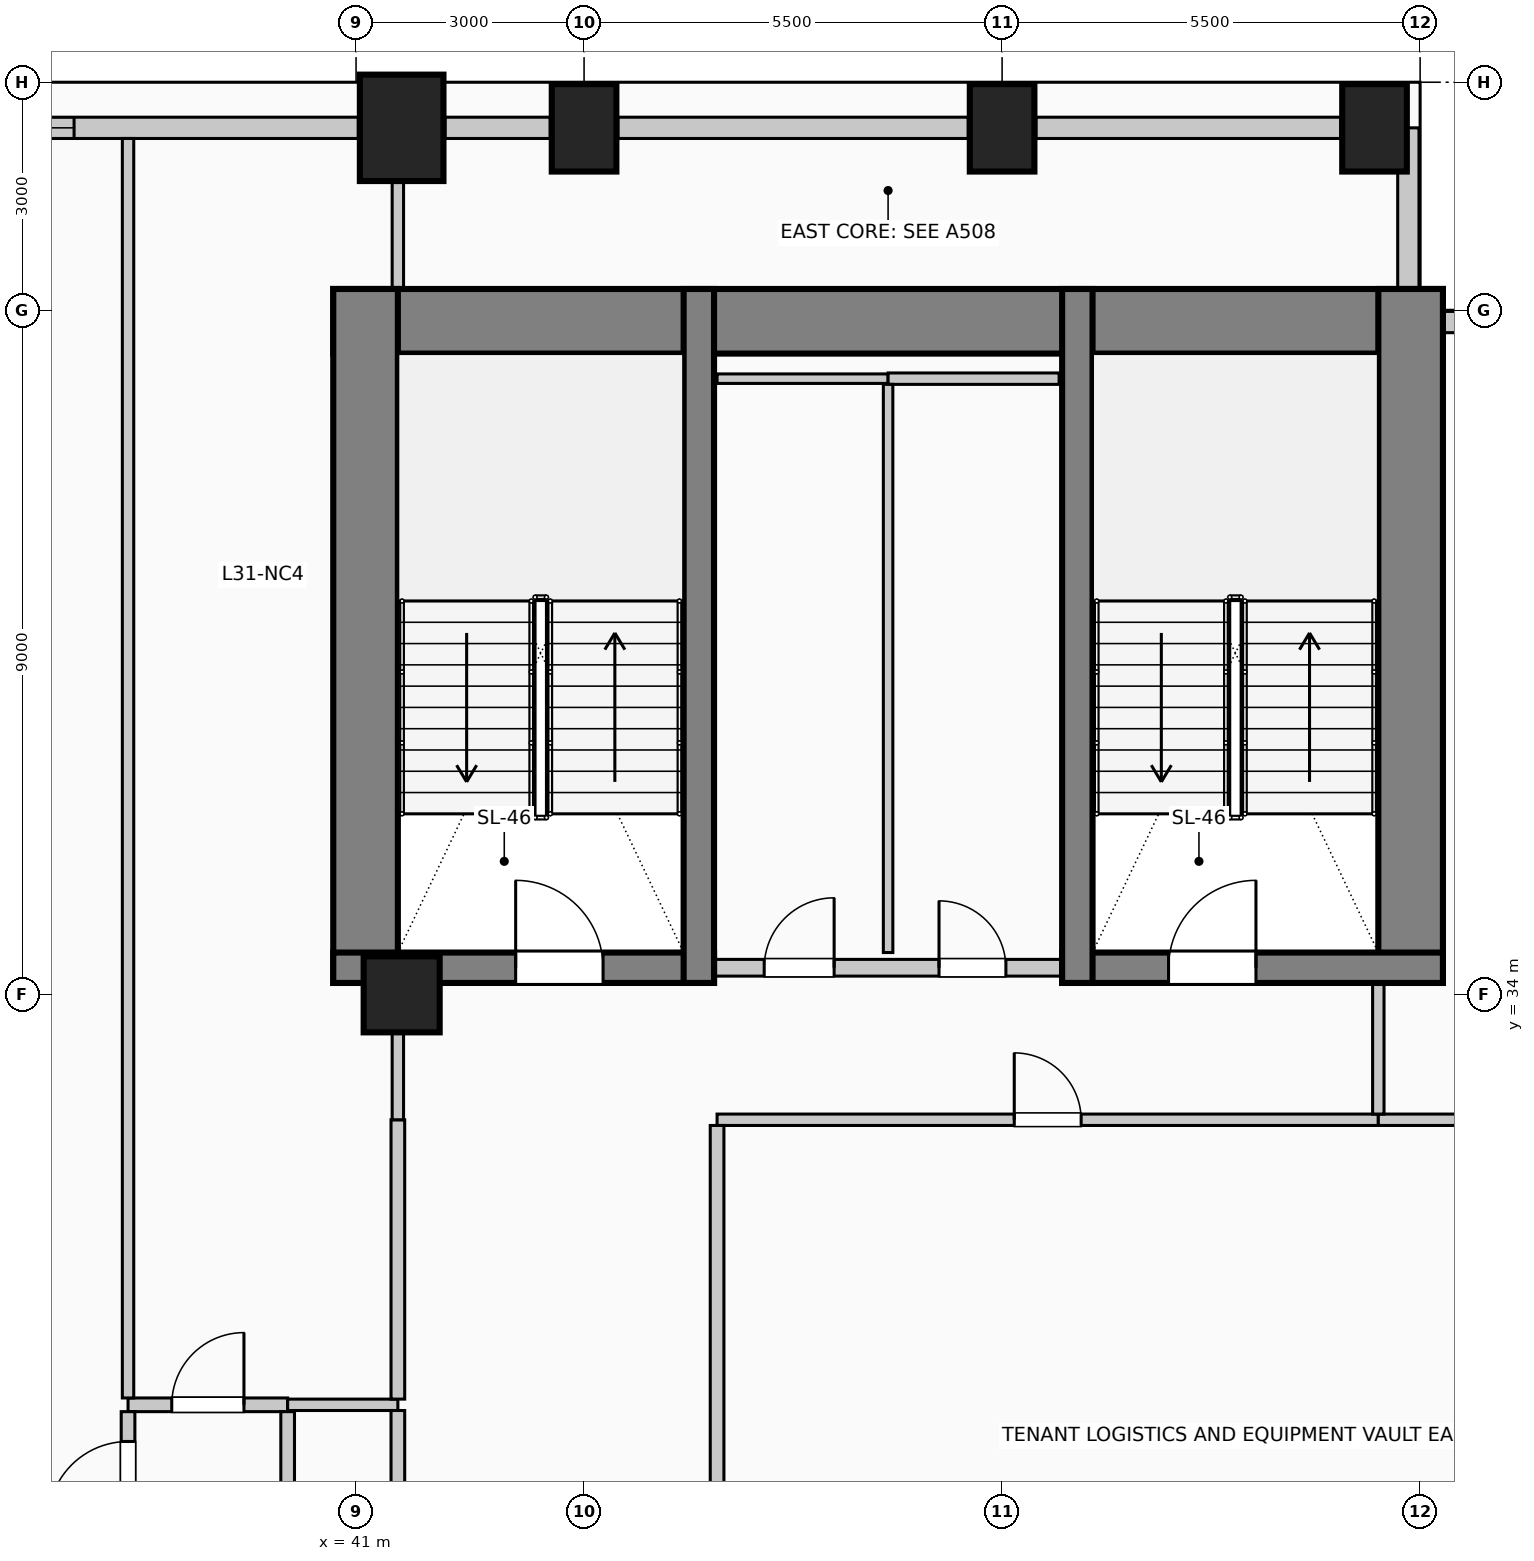
"""IFC4 building model, lengths in metres.
Left out: names, types, materials, properties, quantities, classifications, styles, units other than length and angle.
Written with IfcOpenShell. Run it as: python <this file> out.ifc"""

import sys

from ifc_helpers import new_model, si_unit, direction, frame, frame_2d, origin, origin_2d, place, context, subcontext, project, spatial, rectangle, circle, extrude, element, fill, save


model = new_model("IFC4")
c1 = context("Model", 3, precision=1e-05, world=origin(), true_north=direction((0.0, 1.0)))
c2 = subcontext(c1, "Body", "Model", "MODEL_VIEW")
j1 = project(units=[si_unit("LENGTHUNIT", "METRE"), si_unit("PLANEANGLEUNIT", "RADIAN")], contexts=[c1])
p1 = place(None, origin())
s1 = spatial("IfcSite", under=j1, at=p1, CompositionType="ELEMENT")
p2 = place(p1, origin())
s2 = spatial("IfcBuilding", under=s1, at=p2, CompositionType="ELEMENT")
p3 = place(p2, frame((0.0, 0.0, 128.6)))
s3 = spatial("IfcBuildingStorey", under=s2, at=p3, CompositionType="ELEMENT", Elevation=128.6)
p4 = place(p3, frame((40.7, 42.855, 0.0), z_axis=(0.0, 0.0, 1.0), x_axis=(1.0, 0.0, 0.0)))
e1 = element("IfcWall", 1, at=p4, inside=s3, PredefinedType="SHEAR", context=c2, shape_type="SweptSolid", body=[
    extrude(rectangle(XDim=14.6, YDim=0.85, at=frame_2d((7.3, 0.0))), origin(), (0.0, 0.0, 1.0), 4.0),
])
for number, where, z_axis, x_axis in (
    (2, (41.125, 34.15, 0.0), (0.0, 0.0, 1.0), (0.0, 1.0, 0.0)),
    (3, (54.875, 34.15, 0.0), (0.0, 0.0, 1.0), (0.0, 1.0, 0.0)),
):
    element("IfcWall", number, at=place(p3, frame(where, z_axis=z_axis, x_axis=x_axis)), inside=s3, PredefinedType="SHEAR", context=c2, shape_type="SweptSolid", body=[
        extrude(rectangle(XDim=9.13, YDim=0.85, at=frame_2d((4.565, 0.0))), origin(), (0.0, 0.0, 1.0), 4.0),
    ])
p5 = place(p3, frame((40.7, 34.35, 0.0), z_axis=(0.0, 0.0, 1.0), x_axis=(1.0, 0.0, 0.0)))
e4 = element("IfcWall", 4, at=p5, inside=s3, PredefinedType="SHEAR", context=c2, shape_type="SweptSolid", body=[
    extrude(rectangle(XDim=5.01, YDim=0.4, at=frame_2d((2.505, 0.0))), origin(), (0.0, 0.0, 1.0), 4.0),
])
p6 = place(p5, frame((2.4, 0.0, 0.0)))
e5 = element("IfcOpeningElement", 5, at=p6, cuts=e4, PredefinedType="OPENING", context=c2, shape_type="SweptSolid", body=[
    extrude(rectangle(XDim=1.15, YDim=2.2, at=frame_2d((0.575, 1.1))), frame((0.0, 0.21, 0.0), z_axis=(0.0, -1.0, 0.0), x_axis=(1.0, 0.0, 0.0)), (0.0, 0.0, 1.0), 0.42),
])
p7 = place(p3, frame((45.51, 34.15, 0.0), z_axis=(0.0, 0.0, 1.0), x_axis=(0.0, 1.0, 0.0)))
e6 = element("IfcWall", 6, at=p7, inside=s3, PredefinedType="SHEAR", context=c2, shape_type="SweptSolid", body=[
    extrude(rectangle(XDim=9.13, YDim=0.4, at=frame_2d((4.565, 0.0))), origin(), (0.0, 0.0, 1.0), 4.0),
])
p8 = place(p3, frame((50.29, 34.35, 0.0), z_axis=(0.0, 0.0, 1.0), x_axis=(1.0, 0.0, 0.0)))
e7 = element("IfcWall", 7, at=p8, inside=s3, PredefinedType="SHEAR", context=c2, shape_type="SweptSolid", body=[
    extrude(rectangle(XDim=5.01, YDim=0.4, at=frame_2d((2.505, 0.0))), origin(), (0.0, 0.0, 1.0), 4.0),
])
p9 = place(p8, frame((1.4, 0.0, 0.0)))
e8 = element("IfcOpeningElement", 8, at=p9, cuts=e7, PredefinedType="OPENING", context=c2, shape_type="SweptSolid", body=[
    extrude(rectangle(XDim=1.15, YDim=2.2, at=frame_2d((0.575, 1.1))), frame((0.0, 0.21, 0.0), z_axis=(0.0, -1.0, 0.0), x_axis=(1.0, 0.0, 0.0)), (0.0, 0.0, 1.0), 0.42),
])
p10 = place(p3, frame((50.49, 34.15, 0.0), z_axis=(0.0, 0.0, 1.0), x_axis=(0.0, 1.0, 0.0)))
e9 = element("IfcWall", 9, at=p10, inside=s3, PredefinedType="SHEAR", context=c2, shape_type="SweptSolid", body=[
    extrude(rectangle(XDim=9.13, YDim=0.4, at=frame_2d((4.565, 0.0))), origin(), (0.0, 0.0, 1.0), 4.0),
])
p11 = place(p3, frame((41.6, 45.4, 0.0), z_axis=(0.0, 0.0, 1.0), x_axis=(1.0, 0.0, 0.0)))
e10 = element("IfcColumn", 10, at=p11, inside=s3, PredefinedType="COLUMN", context=c2, shape_type="SweptSolid", body=[
    extrude(rectangle(XDim=1.1, YDim=1.4, at=origin_2d()), origin(), (0.0, 0.0, 1.0), 4.0),
])
for number, where, z_axis, x_axis in (
    (11, (44.0, 45.4, 0.0), (0.0, 0.0, 1.0), (1.0, 0.0, 0.0)),
    (12, (49.5, 45.4, 0.0), (0.0, 0.0, 1.0), (1.0, 0.0, 0.0)),
    (13, (54.4, 45.4, 0.0), (0.0, 0.0, 1.0), (1.0, 0.0, 0.0)),
):
    element("IfcColumn", number, at=place(p3, frame(where, z_axis=z_axis, x_axis=x_axis)), inside=s3, PredefinedType="COLUMN", context=c2, shape_type="SweptSolid", body=[
        extrude(rectangle(XDim=0.85, YDim=1.15, at=origin_2d()), origin(), (0.0, 0.0, 1.0), 4.0),
    ])
p12 = place(p3, frame((41.6, 34.0, 0.0), z_axis=(0.0, 0.0, 1.0), x_axis=(1.0, 0.0, 0.0)))
e14 = element("IfcColumn", 14, at=p12, inside=s3, PredefinedType="COLUMN", context=c2, shape_type="SweptSolid", body=[
    extrude(circle(Radius=0.5, at=origin_2d()), origin(), (0.0, 0.0, 1.0), 4.0),
])
p13 = place(p3, frame((34.57, 45.4, 0.0), z_axis=(0.0, 0.0, 1.0), x_axis=(1.0, 0.0, 0.0)))
e15 = element("IfcWall", 15, at=p13, inside=s3, PredefinedType="SOLIDWALL", context=c2, shape_type="SweptSolid", body=[
    extrude(rectangle(XDim=6.46, YDim=0.28, at=frame_2d((3.23, 0.0))), origin(), (0.0, 0.0, 1.0), 2.875),
])
p14 = place(p13, frame((1.02, 0.0, 0.5)))
e16 = element("IfcOpeningElement", 16, at=p14, cuts=e15, PredefinedType="OPENING", context=c2, shape_type="SweptSolid", body=[
    extrude(rectangle(XDim=1.7, YDim=1.95, at=frame_2d((0.85, 0.975))), frame((0.0, 0.15, 0.0), z_axis=(0.0, -1.0, 0.0), x_axis=(1.0, 0.0, 0.0)), (0.0, 0.0, 1.0), 0.3),
])
p15 = place(p3, frame((42.17, 45.4, 0.0), z_axis=(0.0, 0.0, 1.0), x_axis=(1.0, 0.0, 0.0)))
e17 = element("IfcWall", 17, at=p15, inside=s3, PredefinedType="SOLIDWALL", context=c2, shape_type="SweptSolid", body=[
    extrude(rectangle(XDim=1.385, YDim=0.28, at=frame_2d((0.692, 0.0))), origin(), (0.0, 0.0, 1.0), 2.875),
])
p16 = place(p3, frame((44.445, 45.4, 0.0), z_axis=(0.0, 0.0, 1.0), x_axis=(1.0, 0.0, 0.0)))
e18 = element("IfcWall", 18, at=p16, inside=s3, PredefinedType="SOLIDWALL", context=c2, shape_type="SweptSolid", body=[
    extrude(rectangle(XDim=4.61, YDim=0.28, at=frame_2d((2.305, 0.0))), origin(), (0.0, 0.0, 1.0), 2.875),
])
p17 = place(p3, frame((49.945, 45.4, 0.0), z_axis=(0.0, 0.0, 1.0), x_axis=(1.0, 0.0, 0.0)))
e19 = element("IfcWall", 19, at=p17, inside=s3, PredefinedType="SOLIDWALL", context=c2, shape_type="SweptSolid", body=[
    extrude(rectangle(XDim=4.01, YDim=0.28, at=frame_2d((2.005, 0.0))), origin(), (0.0, 0.0, 1.0), 2.875),
])
p18 = place(p3, frame((54.845, 45.4, 0.0), z_axis=(0.0, 0.0, 1.0), x_axis=(0.0, -1.0, 0.0)))
e20 = element("IfcWall", 20, at=p18, inside=s3, PredefinedType="SOLIDWALL", context=c2, shape_type="SweptSolid", body=[
    extrude(rectangle(XDim=2.115, YDim=0.28, at=frame_2d((1.058, 0.0))), origin(), (0.0, 0.0, 1.0), 3.725),
])
p19 = place(p3, frame((55.305, 42.845, 0.0), z_axis=(0.0, 0.0, 1.0), x_axis=(1.0, 0.0, 0.0)))
e21 = element("IfcWall", 21, at=p19, inside=s3, PredefinedType="SOLIDWALL", context=c2, shape_type="SweptSolid", body=[
    extrude(rectangle(XDim=2.095, YDim=0.28, at=frame_2d((1.047, 0.0))), origin(), (0.0, 0.0, 1.0), 3.725),
])
p20 = place(p3, frame((45.72, 34.35, 0.0), z_axis=(0.0, 0.0, 1.0), x_axis=(1.0, 0.0, 0.0)))
e22 = element("IfcWall", 22, at=p20, inside=s3, PredefinedType="PARTITIONING", context=c2, shape_type="SweptSolid", body=[
    extrude(rectangle(XDim=4.56, YDim=0.22, at=frame_2d((2.28, 0.0))), origin(), (0.0, 0.0, 1.0), 3.725),
])
p21 = place(p20, frame((0.65, 0.0, 0.0)))
e23 = element("IfcOpeningElement", 23, at=p21, cuts=e22, PredefinedType="OPENING", context=c2, shape_type="SweptSolid", body=[
    extrude(rectangle(XDim=0.92, YDim=2.1, at=frame_2d((0.46, 1.05))), frame((0.0, 0.12, 0.0), z_axis=(0.0, -1.0, 0.0), x_axis=(1.0, 0.0, 0.0)), (0.0, 0.0, 1.0), 0.24),
])
p22 = place(p20, frame((2.95, 0.0, 0.0)))
e24 = element("IfcOpeningElement", 24, at=p22, cuts=e22, PredefinedType="OPENING", context=c2, shape_type="SweptSolid", body=[
    extrude(rectangle(XDim=0.88, YDim=2.1, at=frame_2d((0.44, 1.05))), frame((0.0, 0.12, 0.0), z_axis=(0.0, -1.0, 0.0), x_axis=(1.0, 0.0, 0.0)), (0.0, 0.0, 1.0), 0.24),
])
p23 = place(p3, frame((38.0, 28.6, 0.0), z_axis=(0.0, 0.0, 1.0), x_axis=(1.0, 0.0, 0.0)))
e25 = element("IfcWall", 25, at=p23, inside=s3, PredefinedType="PARTITIONING", context=c2, shape_type="SweptSolid", body=[
    extrude(rectangle(XDim=2.1, YDim=0.18, at=frame_2d((1.05, 0.0))), origin(), (0.0, 0.0, 1.0), 3.725),
])
p24 = place(p23, frame((0.575, 0.0, 0.0)))
e26 = element("IfcOpeningElement", 26, at=p24, cuts=e25, PredefinedType="OPENING", context=c2, shape_type="SweptSolid", body=[
    extrude(rectangle(XDim=0.95, YDim=2.15, at=frame_2d((0.475, 1.075))), frame((0.0, 0.1, 0.0), z_axis=(0.0, -1.0, 0.0), x_axis=(1.0, 0.0, 0.0)), (0.0, 0.0, 1.0), 0.2),
])
p25 = place(p3, frame((40.1, 28.6, 0.0), z_axis=(0.0, 0.0, 1.0), x_axis=(1.0, 0.0, 0.0)))
e27 = element("IfcWall", 27, at=p25, inside=s3, PredefinedType="PARTITIONING", context=c2, shape_type="SweptSolid", body=[
    extrude(rectangle(XDim=1.45, YDim=0.15, at=frame_2d((0.725, 0.0))), origin(), (0.0, 0.0, 1.0), 3.725),
])
p26 = place(p3, frame((45.75, 32.35, 0.0), z_axis=(0.0, 0.0, 1.0), x_axis=(1.0, 0.0, 0.0)))
e28 = element("IfcWall", 28, at=p26, inside=s3, PredefinedType="PARTITIONING", context=c2, shape_type="SweptSolid", body=[
    extrude(rectangle(XDim=8.7, YDim=0.15, at=frame_2d((4.35, 0.0))), origin(), (0.0, 0.0, 1.0), 3.725),
])
p27 = place(p26, frame((3.91, 0.0, 0.0)))
e29 = element("IfcOpeningElement", 29, at=p27, cuts=e28, PredefinedType="OPENING", context=c2, shape_type="SweptSolid", body=[
    extrude(rectangle(XDim=0.88, YDim=2.1, at=frame_2d((0.44, 1.05))), frame((0.0, 0.085, 0.0), z_axis=(0.0, -1.0, 0.0), x_axis=(1.0, 0.0, 0.0)), (0.0, 0.0, 1.0), 0.17),
])
p28 = place(p3, frame((54.45, 32.35, 0.0), z_axis=(0.0, 0.0, 1.0), x_axis=(1.0, 0.0, 0.0)))
e30 = element("IfcWall", 30, at=p28, inside=s3, PredefinedType="PARTITIONING", context=c2, shape_type="SweptSolid", body=[
    extrude(rectangle(XDim=2.81, YDim=0.15, at=frame_2d((1.405, 0.0))), origin(), (0.0, 0.0, 1.0), 3.725),
])
p29 = place(p3, frame((45.75, 42.1, 0.0), z_axis=(0.0, 0.0, 1.0), x_axis=(1.0, 0.0, 0.0)))
e31 = element("IfcWall", 31, at=p29, inside=s3, PredefinedType="PARTITIONING", context=c2, shape_type="SweptSolid", body=[
    extrude(rectangle(XDim=2.25, YDim=0.125, at=frame_2d((1.125, 0.0))), origin(), (0.0, 0.0, 1.0), 3.725),
])
p30 = place(p3, frame((48.0, 42.1, 0.0), z_axis=(0.0, 0.0, 1.0), x_axis=(1.0, 0.0, 0.0)))
e32 = element("IfcWall", 32, at=p30, inside=s3, PredefinedType="PARTITIONING", context=c2, shape_type="SweptSolid", body=[
    extrude(rectangle(XDim=2.25, YDim=0.15, at=frame_2d((1.125, 0.0))), origin(), (0.0, 0.0, 1.0), 3.725),
])
p31 = place(p3, frame((38.0, 26.675, 0.0), z_axis=(0.0, 0.0, 1.0), x_axis=(0.0, 1.0, 0.0)))
e33 = element("IfcWall", 33, at=p31, inside=s3, PredefinedType="PARTITIONING", context=c2, shape_type="SweptSolid", body=[
    extrude(rectangle(XDim=1.835, YDim=0.18, at=frame_2d((0.917, 0.0))), origin(), (0.0, 0.0, 1.0), 3.725),
])
p32 = place(p31, frame((0.393, 0.0, 0.0)))
e34 = element("IfcOpeningElement", 34, at=p32, cuts=e33, PredefinedType="OPENING", context=c2, shape_type="SweptSolid", body=[
    extrude(rectangle(XDim=1.05, YDim=2.15, at=frame_2d((0.525, 1.075))), frame((0.0, 0.1, 0.0), z_axis=(0.0, -1.0, 0.0), x_axis=(1.0, 0.0, 0.0)), (0.0, 0.0, 1.0), 0.2),
])
p33 = place(p3, frame((38.0, 28.69, 0.0), z_axis=(0.0, 0.0, 1.0), x_axis=(0.0, 1.0, 0.0)))
e35 = element("IfcWall", 35, at=p33, inside=s3, PredefinedType="PARTITIONING", context=c2, shape_type="SweptSolid", body=[
    extrude(rectangle(XDim=16.57, YDim=0.15, at=frame_2d((8.285, 0.0))), origin(), (0.0, 0.0, 1.0), 3.725),
])
p34 = place(p3, frame((40.1, 15.74, 0.0), z_axis=(0.0, 0.0, 1.0), x_axis=(0.0, 1.0, 0.0)))
e36 = element("IfcWall", 36, at=p34, inside=s3, PredefinedType="PARTITIONING", context=c2, shape_type="SweptSolid", body=[
    extrude(rectangle(XDim=12.77, YDim=0.18, at=frame_2d((6.385, 0.0))), origin(), (0.0, 0.0, 1.0), 3.725),
])
p35 = place(p3, frame((41.55, 18.5, 0.0), z_axis=(0.0, 0.0, 1.0), x_axis=(0.0, 1.0, 0.0)))
e37 = element("IfcWall", 37, at=p35, inside=s3, PredefinedType="PARTITIONING", context=c2, shape_type="SweptSolid", body=[
    extrude(rectangle(XDim=10.025, YDim=0.18, at=frame_2d((5.012, 0.0))), origin(), (0.0, 0.0, 1.0), 3.07),
])
p36 = place(p3, frame((41.55, 28.675, 0.0), z_axis=(0.0, 0.0, 1.0), x_axis=(0.0, 1.0, 0.0)))
e38 = element("IfcWall", 38, at=p36, inside=s3, PredefinedType="PARTITIONING", context=c2, shape_type="SweptSolid", body=[
    extrude(rectangle(XDim=3.675, YDim=0.18, at=frame_2d((1.837, 0.0))), origin(), (0.0, 0.0, 1.0), 3.07),
])
p37 = place(p3, frame((41.55, 32.35, 0.0), z_axis=(0.0, 0.0, 1.0), x_axis=(0.0, 1.0, 0.0)))
e39 = element("IfcWall", 39, at=p37, inside=s3, PredefinedType="PARTITIONING", context=c2, shape_type="SweptSolid", body=[
    extrude(rectangle(XDim=1.15, YDim=0.15, at=frame_2d((0.575, 0.0))), origin(), (0.0, 0.0, 1.0), 3.07),
])
p38 = place(p3, frame((41.55, 43.28, 0.0), z_axis=(0.0, 0.0, 1.0), x_axis=(0.0, 1.0, 0.0)))
e40 = element("IfcWall", 40, at=p38, inside=s3, PredefinedType="PARTITIONING", context=c2, shape_type="SweptSolid", body=[
    extrude(rectangle(XDim=1.42, YDim=0.15, at=frame_2d((0.71, 0.0))), origin(), (0.0, 0.0, 1.0), 3.725),
])
p39 = place(p3, frame((45.75, 24.075, 0.0), z_axis=(0.0, 0.0, 1.0), x_axis=(0.0, 1.0, 0.0)))
e41 = element("IfcWall", 41, at=p39, inside=s3, PredefinedType="PARTITIONING", context=c2, shape_type="SweptSolid", body=[
    extrude(rectangle(XDim=8.2, YDim=0.18, at=frame_2d((4.1, 0.0))), origin(), (0.0, 0.0, 1.0), 3.725),
])
p40 = place(p3, frame((48.0, 34.55, 0.0), z_axis=(0.0, 0.0, 1.0), x_axis=(0.0, 1.0, 0.0)))
e42 = element("IfcWall", 42, at=p40, inside=s3, PredefinedType="PARTITIONING", context=c2, shape_type="SweptSolid", body=[
    extrude(rectangle(XDim=7.475, YDim=0.125, at=frame_2d((3.737, 0.0))), origin(), (0.0, 0.0, 1.0), 3.725),
])
p41 = place(p3, frame((54.45, 32.425, 0.0), z_axis=(0.0, 0.0, 1.0), x_axis=(0.0, 1.0, 0.0)))
e43 = element("IfcWall", 43, at=p41, inside=s3, PredefinedType="PARTITIONING", context=c2, shape_type="SweptSolid", body=[
    extrude(rectangle(XDim=1.725, YDim=0.15, at=frame_2d((0.862, 0.0))), origin(), (0.0, 0.0, 1.0), 3.725),
])
p42 = place(p14, origin())
e44 = element("IfcWindow", 44, at=p42, inside=s3, PartitioningType="SINGLE_PANEL", PredefinedType="WINDOW", context=c2, shape_type="SweptSolid", body=[
    extrude(rectangle(XDim=1.7, YDim=1.95, at=frame_2d((0.85, 0.975))), frame((0.0, 0.03, 0.0), z_axis=(0.0, -1.0, 0.0), x_axis=(1.0, 0.0, 0.0)), (0.0, 0.0, 1.0), 0.06),
])
fill(e16, e44)
p43 = place(p6, origin())
e45 = element("IfcDoor", 45, at=p43, inside=s3, OperationType="SINGLE_SWING_LEFT", PredefinedType="DOOR", context=c2, shape_type="SweptSolid", body=[
    extrude(rectangle(XDim=1.15, YDim=2.2, at=frame_2d((0.575, 1.1))), frame((0.0, 0.025, 0.0), z_axis=(0.0, -1.0, 0.0), x_axis=(1.0, 0.0, 0.0)), (0.0, 0.0, 1.0), 0.05),
])
fill(e5, e45)
p44 = place(p21, origin())
e46 = element("IfcDoor", 46, at=p44, inside=s3, OperationType="SINGLE_SWING_RIGHT", PredefinedType="DOOR", context=c2, shape_type="SweptSolid", body=[
    extrude(rectangle(XDim=0.92, YDim=2.1, at=frame_2d((0.46, 1.05))), frame((0.0, 0.025, 0.0), z_axis=(0.0, -1.0, 0.0), x_axis=(1.0, 0.0, 0.0)), (0.0, 0.0, 1.0), 0.05),
])
fill(e23, e46)
p45 = place(p22, origin())
e47 = element("IfcDoor", 47, at=p45, inside=s3, OperationType="SINGLE_SWING_LEFT", PredefinedType="DOOR", context=c2, shape_type="SweptSolid", body=[
    extrude(rectangle(XDim=0.88, YDim=2.1, at=frame_2d((0.44, 1.05))), frame((0.0, 0.025, 0.0), z_axis=(0.0, -1.0, 0.0), x_axis=(1.0, 0.0, 0.0)), (0.0, 0.0, 1.0), 0.05),
])
fill(e24, e47)
p46 = place(p9, origin())
e48 = element("IfcDoor", 48, at=p46, inside=s3, OperationType="SINGLE_SWING_RIGHT", PredefinedType="DOOR", context=c2, shape_type="SweptSolid", body=[
    extrude(rectangle(XDim=1.15, YDim=2.2, at=frame_2d((0.575, 1.1))), frame((0.0, 0.025, 0.0), z_axis=(0.0, -1.0, 0.0), x_axis=(1.0, 0.0, 0.0)), (0.0, 0.0, 1.0), 0.05),
])
fill(e8, e48)
p47 = place(p24, origin())
e49 = element("IfcDoor", 49, at=p47, inside=s3, OperationType="SINGLE_SWING_RIGHT", PredefinedType="DOOR", context=c2, shape_type="SweptSolid", body=[
    extrude(rectangle(XDim=0.95, YDim=2.15, at=frame_2d((0.475, 1.075))), frame((0.0, 0.025, 0.0), z_axis=(0.0, -1.0, 0.0), x_axis=(1.0, 0.0, 0.0)), (0.0, 0.0, 1.0), 0.05),
])
fill(e26, e49)
p48 = place(p27, origin())
e50 = element("IfcDoor", 50, at=p48, inside=s3, OperationType="SINGLE_SWING_LEFT", PredefinedType="DOOR", context=c2, shape_type="SweptSolid", body=[
    extrude(rectangle(XDim=0.88, YDim=2.1, at=frame_2d((0.44, 1.05))), frame((0.0, 0.025, 0.0), z_axis=(0.0, -1.0, 0.0), x_axis=(1.0, 0.0, 0.0)), (0.0, 0.0, 1.0), 0.05),
])
fill(e29, e50)
p49 = place(p32, origin())
e51 = element("IfcDoor", 51, at=p49, inside=s3, OperationType="SINGLE_SWING_LEFT", PredefinedType="DOOR", context=c2, shape_type="SweptSolid", body=[
    extrude(rectangle(XDim=1.05, YDim=2.15, at=frame_2d((0.525, 1.075))), frame((0.0, 0.025, 0.0), z_axis=(0.0, -1.0, 0.0), x_axis=(1.0, 0.0, 0.0)), (0.0, 0.0, 1.0), 0.05),
])
fill(e34, e51)
save(model, sys.argv[1])
